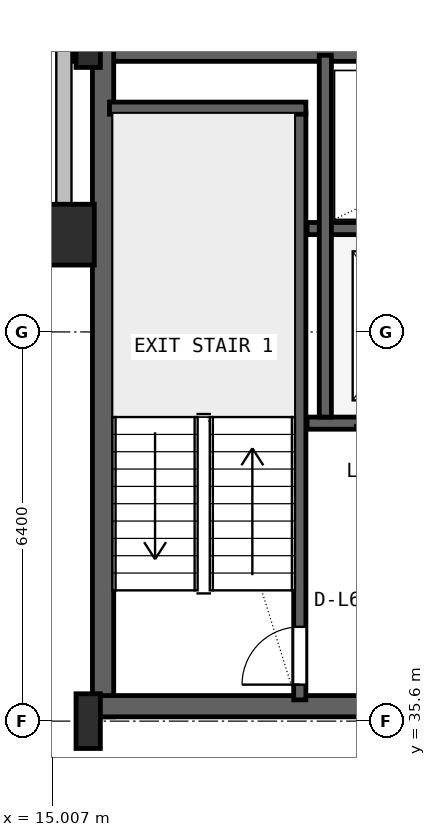
"""IFC4 building model, lengths in metres.
Left out: names, types, materials, properties, quantities, classifications, styles, units other than length and angle.
Written with IfcOpenShell. Run it as: python <this file> out.ifc"""

import sys

from ifc_helpers import new_model, si_unit, direction, frame, frame_2d, origin, origin_2d, place, context, subcontext, project, spatial, rectangle, hollow_rectangle, i_section, extrude, source, transform, mapped, element, fill, save


model = new_model("IFC4")
c1 = context("Model", 3, precision=1e-05, world=origin(), true_north=direction((0.0, 1.0)))
c2 = subcontext(c1, "Body", "Model", "MODEL_VIEW")
j1 = project(units=[si_unit("LENGTHUNIT", "METRE"), si_unit("PLANEANGLEUNIT", "RADIAN")], contexts=[c1])
p1 = place(None, origin())
s1 = spatial("IfcSite", under=j1, at=p1, CompositionType="ELEMENT")
p2 = place(p1, origin())
s2 = spatial("IfcBuilding", under=s1, at=p2, CompositionType="ELEMENT")
p3 = place(p2, frame((0.0, 0.0, 262.2)))
s3 = spatial("IfcBuildingStorey", under=s2, at=p3, CompositionType="ELEMENT", Elevation=262.2)
p4 = place(p3, frame((15.325, 46.625, 0.0), z_axis=(0.0, 0.0, 1.0), x_axis=(1.0, 0.0, 0.0)))
e1 = element("IfcWall", 1, at=p4, inside=s3, PredefinedType="SHEAR", context=c2, shape_type="SweptSolid", body=[
    extrude(rectangle(XDim=37.35, YDim=0.35, at=frame_2d((18.675, 0.0))), origin(), (0.0, 0.0, 1.0), 3.55),
])
p5 = place(p3, frame((15.845, 35.67, 0.0), z_axis=(0.0, 0.0, 1.0), x_axis=(0.0, 1.0, 0.0)))
e2 = element("IfcWall", 2, at=p5, inside=s3, PredefinedType="SHEAR", context=c2, shape_type="SweptSolid", body=[
    extrude(rectangle(XDim=11.13, YDim=0.35, at=frame_2d((5.565, 0.0))), origin(), (0.0, 0.0, 1.0), 3.55),
])
p6 = place(p3, frame((15.67, 35.845, 0.0), z_axis=(0.0, 0.0, 1.0), x_axis=(1.0, 0.0, 0.0)))
e3 = element("IfcWall", 3, at=p6, inside=s3, PredefinedType="SHEAR", context=c2, shape_type="SweptSolid", body=[
    extrude(rectangle(XDim=9.13, YDim=0.35, at=frame_2d((4.565, 0.0))), origin(), (0.0, 0.0, 1.0), 3.55),
])
p7 = place(p6, frame((5.4, 0.0, 0.0)))
e4 = element("IfcOpeningElement", 4, at=p7, cuts=e3, PredefinedType="OPENING", context=c2, shape_type="SweptSolid", body=[
    extrude(rectangle(XDim=1.0, YDim=2.1, at=frame_2d((0.5, 1.05))), frame((0.0, 0.185, 0.0), z_axis=(0.0, -1.0, 0.0), x_axis=(1.0, 0.0, 0.0)), (0.0, 0.0, 1.0), 0.37),
])
m1 = source(origin(), c2, "Body", "SweptSolid", [
    extrude(i_section(OverallWidth=0.4, OverallDepth=0.9, WebThickness=0.016, FlangeThickness=0.028, FilletRadius=0.016, at=origin_2d()), origin(), (0.0, 0.0, 1.0), 3.8),
])
for number, where, z_axis, x_axis in (
    (5, (15.6, 35.6, 0.0), (0.0, 0.0, 1.0), (1.0, 0.0, 0.0)),
    (6, (15.6, 46.8, 0.0), (0.0, 0.0, 1.0), (1.0, 0.0, 0.0)),
):
    element("IfcColumn", number, at=place(p3, frame(where, z_axis=z_axis, x_axis=x_axis)), inside=s3, PredefinedType="COLUMN", context=c2, shape_type="MappedRepresentation", body=[
        mapped(m1, transform((0.0, 0.0, 0.0), x_axis=(1.0, 0.0, 0.0), y_axis=(0.0, 1.0, 0.0), z_axis=(0.0, 0.0, 1.0), scale=1.0)),
    ])
m2 = source(origin(), c2, "Body", "SweptSolid", [
    extrude(hollow_rectangle(XDim=1.0, YDim=1.0, WallThickness=0.04, at=origin_2d()), origin(), (0.0, 0.0, 1.0), 3.8),
])
p8 = place(p3, frame((15.2, 43.6, 0.0), z_axis=(0.0, 0.0, 1.0), x_axis=(1.0, 0.0, 0.0)))
e7 = element("IfcColumn", 7, at=p8, inside=s3, PredefinedType="COLUMN", context=c2, shape_type="MappedRepresentation", body=[
    mapped(m2, transform((0.0, 0.0, 0.0), x_axis=(1.0, 0.0, 0.0), y_axis=(0.0, 1.0, 0.0), z_axis=(0.0, 0.0, 1.0), scale=1.0)),
])
p9 = place(p3, frame((12.08, 43.6, 0.0), z_axis=(0.0, 0.0, 1.0), x_axis=(1.0, 0.0, 0.0)))
e8 = element("IfcWall", 8, at=p9, inside=s3, PredefinedType="SOLIDWALL", context=c2, shape_type="SweptSolid", body=[
    extrude(rectangle(XDim=2.99, YDim=0.25, at=frame_2d((1.495, 0.0))), origin(), (0.0, 0.0, 1.0), 3.53),
])
p10 = place(p3, frame((15.2, 43.52, 0.0), z_axis=(0.0, 0.0, 1.0), x_axis=(0.0, 1.0, 0.0)))
e9 = element("IfcWall", 9, at=p10, inside=s3, PredefinedType="SOLIDWALL", context=c2, shape_type="SweptSolid", body=[
    extrude(rectangle(XDim=3.2, YDim=0.25, at=frame_2d((1.6, 0.0))), origin(), (0.0, 0.0, 1.0), 3.171),
])
p11 = place(p3, frame((19.08, 35.95, 0.0), z_axis=(0.0, 0.0, 1.0), x_axis=(0.0, 1.0, 0.0)))
e10 = element("IfcWall", 10, at=p11, inside=s3, PredefinedType="SHEAR", context=c2, shape_type="SweptSolid", body=[
    extrude(rectangle(XDim=9.65, YDim=0.2, at=frame_2d((4.825, 0.0))), origin(), (0.0, 0.0, 1.0), 3.55),
])
p12 = place(p11, frame((0.25, 0.0, 0.0)))
e11 = element("IfcOpeningElement", 11, at=p12, cuts=e10, PredefinedType="OPENING", context=c2, shape_type="SweptSolid", body=[
    extrude(rectangle(XDim=0.95, YDim=2.1, at=frame_2d((0.475, 1.05))), frame((0.0, 0.11, 0.0), z_axis=(0.0, -1.0, 0.0), x_axis=(1.0, 0.0, 0.0)), (0.0, 0.0, 1.0), 0.22),
])
p13 = place(p3, frame((15.95, 45.68, 0.0), z_axis=(0.0, 0.0, 1.0), x_axis=(1.0, 0.0, 0.0)))
e12 = element("IfcWall", 12, at=p13, inside=s3, PredefinedType="SHEAR", context=c2, shape_type="SweptSolid", body=[
    extrude(rectangle(XDim=3.23, YDim=0.2, at=frame_2d((1.615, 0.0))), origin(), (0.0, 0.0, 1.0), 3.55),
])
p14 = place(p3, frame((19.2, 40.5, 0.0), z_axis=(0.0, 0.0, 1.0), x_axis=(1.0, 0.0, 0.0)))
e13 = element("IfcWall", 13, at=p14, inside=s3, PredefinedType="SHEAR", context=c2, shape_type="SweptSolid", body=[
    extrude(rectangle(XDim=5.52, YDim=0.2, at=frame_2d((2.76, 0.0))), origin(), (0.0, 0.0, 1.0), 3.55),
])
p15 = place(p14, frame((1.05, 0.0, 0.0)))
e14 = element("IfcOpeningElement", 14, at=p15, cuts=e13, PredefinedType="OPENING", context=c2, shape_type="SweptSolid", body=[
    extrude(rectangle(XDim=1.1, YDim=2.18, at=frame_2d((0.55, 1.09))), frame((0.0, 0.11, 0.0), z_axis=(0.0, -1.0, 0.0), x_axis=(1.0, 0.0, 0.0)), (0.0, 0.0, 1.0), 0.22),
])
p16 = place(p14, frame((3.65, 0.0, 0.0)))
e15 = element("IfcOpeningElement", 15, at=p16, cuts=e13, PredefinedType="OPENING", context=c2, shape_type="SweptSolid", body=[
    extrude(rectangle(XDim=1.1, YDim=2.18, at=frame_2d((0.55, 1.09))), frame((0.0, 0.11, 0.0), z_axis=(0.0, -1.0, 0.0), x_axis=(1.0, 0.0, 0.0)), (0.0, 0.0, 1.0), 0.22),
])
p17 = place(p3, frame((19.2, 43.7, 0.0), z_axis=(0.0, 0.0, 1.0), x_axis=(1.0, 0.0, 0.0)))
e16 = element("IfcWall", 16, at=p17, inside=s3, PredefinedType="SHEAR", context=c2, shape_type="SweptSolid", body=[
    extrude(rectangle(XDim=5.52, YDim=0.2, at=frame_2d((2.76, 0.0))), origin(), (0.0, 0.0, 1.0), 3.55),
])
p18 = place(p3, frame((19.5, 40.6, 0.0), z_axis=(0.0, 0.0, 1.0), x_axis=(0.0, 1.0, 0.0)))
e17 = element("IfcWall", 17, at=p18, inside=s3, PredefinedType="SHEAR", context=c2, shape_type="SweptSolid", body=[
    extrude(rectangle(XDim=5.95, YDim=0.2, at=frame_2d((2.975, 0.0))), origin(), (0.0, 0.0, 1.0), 3.55),
])
m3 = source(origin(), c2, "Body", "SweptSolid", [
    extrude(rectangle(XDim=0.95, YDim=2.1, at=frame_2d((0.475, 1.05))), frame((0.0, 0.025, 0.0), z_axis=(0.0, -1.0, 0.0), x_axis=(1.0, 0.0, 0.0)), (0.0, 0.0, 1.0), 0.05),
])
p19 = place(p12, origin())
e18 = element("IfcDoor", 18, at=p19, inside=s3, OperationType="SINGLE_SWING_LEFT", PredefinedType="DOOR", context=c2, shape_type="MappedRepresentation", body=[
    mapped(m3, transform((0.0, 0.0, 0.0), x_axis=(1.0, 0.0, 0.0), y_axis=(0.0, 1.0, 0.0), z_axis=(0.0, 0.0, 1.0), scale=1.0)),
])
fill(e11, e18)
save(model, sys.argv[1])
